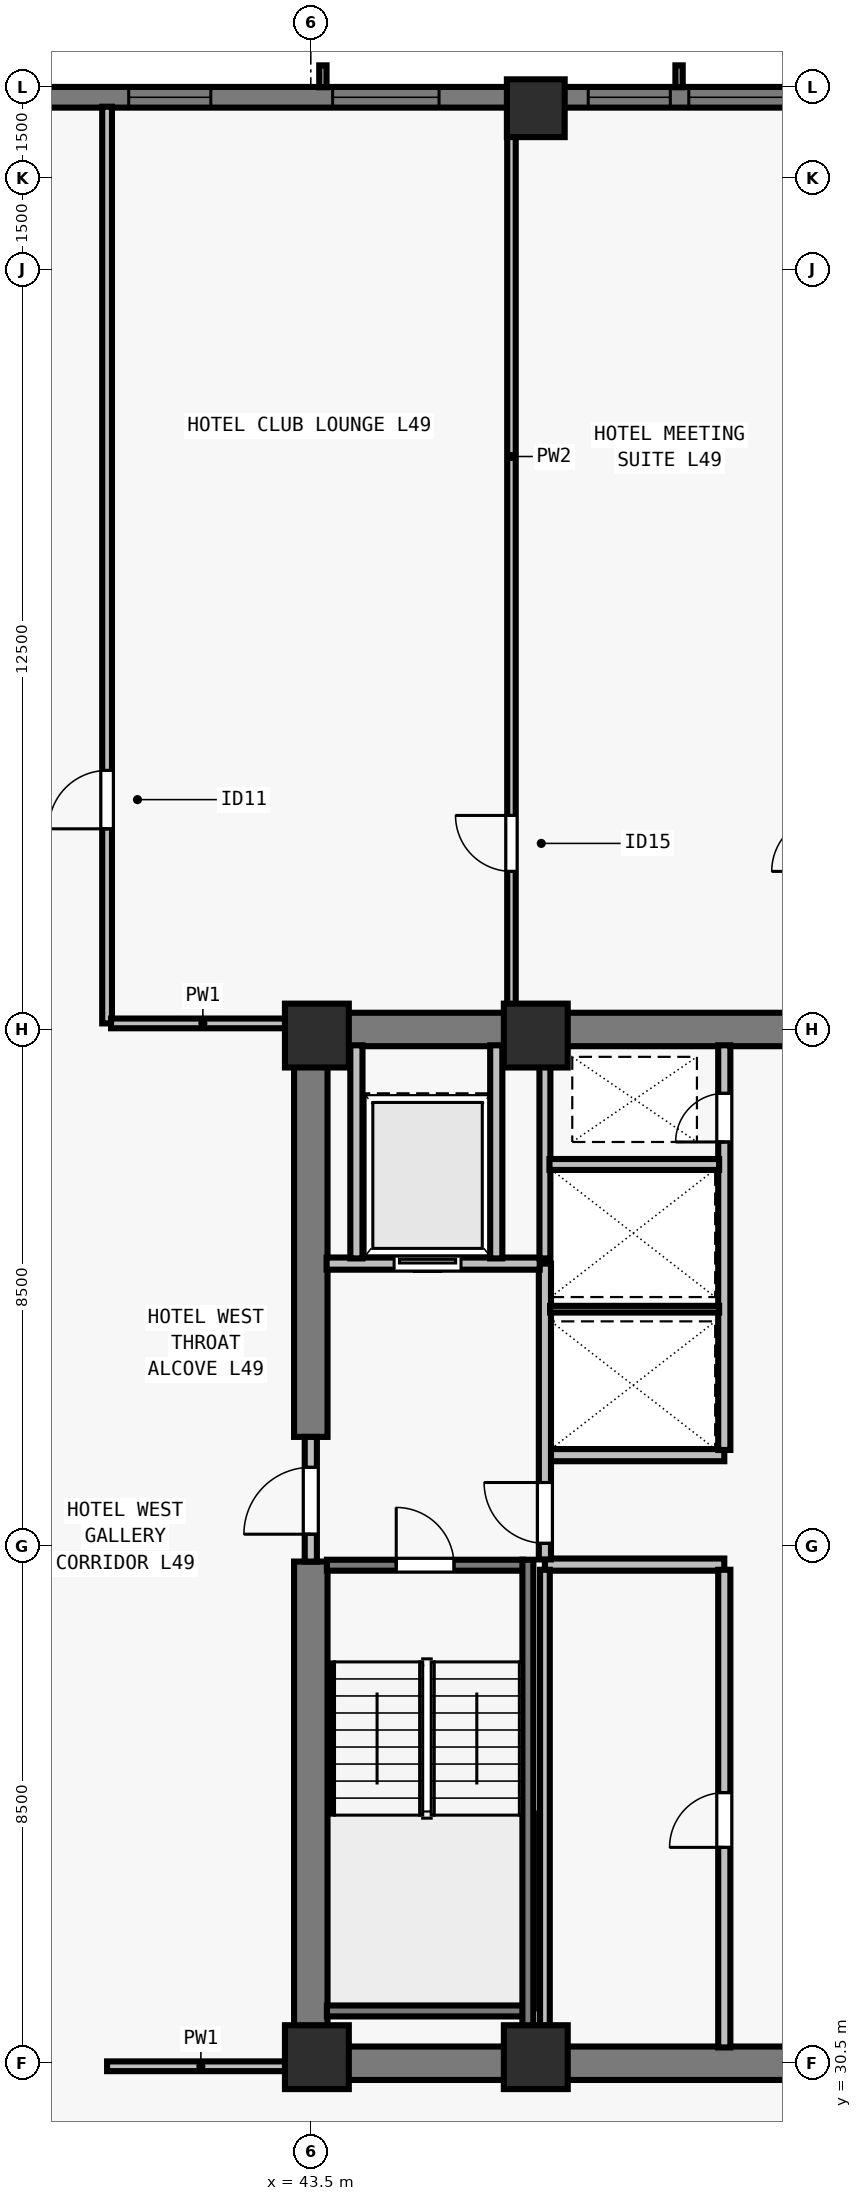
"""IFC4 building model, lengths in metres.
Left out: names, types, materials, properties, quantities, classifications, styles, units other than length and angle.
Written with IfcOpenShell. Run it as: python <this file> out.ifc"""

import sys

from ifc_helpers import new_model, si_unit, direction, frame, frame_2d, origin, origin_2d, place, context, subcontext, project, spatial, rectangle, extrude, element, fill, save


model = new_model("IFC4")
c1 = context("Model", 3, precision=1e-05, world=origin(), true_north=direction((0.0, 1.0)))
c2 = subcontext(c1, "Body", "Model", "MODEL_VIEW")
j1 = project(units=[si_unit("LENGTHUNIT", "METRE"), si_unit("PLANEANGLEUNIT", "RADIAN")], contexts=[c1])
p1 = place(None, origin())
s1 = spatial("IfcSite", under=j1, at=p1, CompositionType="ELEMENT")
p2 = place(p1, origin())
s2 = spatial("IfcBuilding", under=s1, at=p2, CompositionType="ELEMENT")
p3 = place(p2, frame((0.0, 0.0, 179.5)))
s3 = spatial("IfcBuildingStorey", under=s2, at=p3, CompositionType="ELEMENT", Elevation=179.5)
for number, where, z_axis, x_axis in (
    (1, (43.6, 30.6, 0.0), (0.0, 0.0, 1.0), (1.0, 0.0, 0.0)),
    (2, (47.2, 30.6, 0.0), (0.0, 0.0, 1.0), (1.0, 0.0, 0.0)),
    (3, (43.6, 47.4, 0.0), (0.0, 0.0, 1.0), (1.0, 0.0, 0.0)),
    (4, (47.2, 47.4, 0.0), (0.0, 0.0, 1.0), (1.0, 0.0, 0.0)),
):
    element("IfcColumn", number, at=place(p3, frame(where, z_axis=z_axis, x_axis=x_axis)), inside=s3, PredefinedType="COLUMN", context=c2, shape_type="SweptSolid", body=[
        extrude(rectangle(XDim=1.05, YDim=1.05, at=origin_2d()), origin(), (0.0, 0.0, 1.0), 3.5),
    ])
p4 = place(p3, frame((47.2, 62.65, 0.0), z_axis=(0.0, 0.0, 1.0), x_axis=(1.0, 0.0, 0.0)))
e5 = element("IfcColumn", 5, at=p4, inside=s3, PredefinedType="COLUMN", context=c2, shape_type="SweptSolid", body=[
    extrude(rectangle(XDim=0.95, YDim=0.95, at=origin_2d()), origin(), (0.0, 0.0, 1.0), 3.5),
])
p5 = place(p3, frame((32.0, 62.83, 0.0), z_axis=(0.0, 0.0, 1.0), x_axis=(1.0, 0.0, 0.0)))
e6 = element("IfcWall", 6, at=p5, inside=s3, PredefinedType="SOLIDWALL", context=c2, shape_type="SweptSolid", body=[
    extrude(rectangle(XDim=39.682, YDim=0.34, at=frame_2d((19.841, 0.0))), origin(), (0.0, 0.0, 1.0), 3.28),
])
p6 = place(p5, frame((3.902, 0.0, 0.8)))
e7 = element("IfcOpeningElement", 7, at=p6, cuts=e6, PredefinedType="OPENING", context=c2, shape_type="SweptSolid", body=[
    extrude(rectangle(XDim=1.75, YDim=1.66, at=frame_2d((0.875, 0.83))), frame((0.0, 0.18, 0.0), z_axis=(0.0, -1.0, 0.0), x_axis=(1.0, 0.0, 0.0)), (0.0, 0.0, 1.0), 0.36),
])
p7 = place(p5, frame((8.505, 0.0, 0.8)))
e8 = element("IfcOpeningElement", 8, at=p7, cuts=e6, PredefinedType="OPENING", context=c2, shape_type="SweptSolid", body=[
    extrude(rectangle(XDim=1.35, YDim=1.66, at=frame_2d((0.675, 0.83))), frame((0.0, 0.18, 0.0), z_axis=(0.0, -1.0, 0.0), x_axis=(1.0, 0.0, 0.0)), (0.0, 0.0, 1.0), 0.36),
])
p8 = place(p5, frame((11.859, 0.0, 0.8)))
e9 = element("IfcOpeningElement", 9, at=p8, cuts=e6, PredefinedType="OPENING", context=c2, shape_type="SweptSolid", body=[
    extrude(rectangle(XDim=1.75, YDim=1.66, at=frame_2d((0.875, 0.83))), frame((0.0, 0.18, 0.0), z_axis=(0.0, -1.0, 0.0), x_axis=(1.0, 0.0, 0.0)), (0.0, 0.0, 1.0), 0.36),
])
p9 = place(p5, frame((16.062, 0.0, 0.8)))
e10 = element("IfcOpeningElement", 10, at=p9, cuts=e6, PredefinedType="OPENING", context=c2, shape_type="SweptSolid", body=[
    extrude(rectangle(XDim=1.35, YDim=1.66, at=frame_2d((0.675, 0.83))), frame((0.0, 0.18, 0.0), z_axis=(0.0, -1.0, 0.0), x_axis=(1.0, 0.0, 0.0)), (0.0, 0.0, 1.0), 0.36),
])
p10 = place(p5, frame((17.716, 0.0, 0.8)))
e11 = element("IfcOpeningElement", 11, at=p10, cuts=e6, PredefinedType="OPENING", context=c2, shape_type="SweptSolid", body=[
    extrude(rectangle(XDim=1.75, YDim=1.66, at=frame_2d((0.875, 0.83))), frame((0.0, 0.18, 0.0), z_axis=(0.0, -1.0, 0.0), x_axis=(1.0, 0.0, 0.0)), (0.0, 0.0, 1.0), 0.36),
])
p11 = place(p5, frame((22.719, 0.0, 0.8)))
e12 = element("IfcOpeningElement", 12, at=p11, cuts=e6, PredefinedType="OPENING", context=c2, shape_type="SweptSolid", body=[
    extrude(rectangle(XDim=1.35, YDim=1.66, at=frame_2d((0.675, 0.83))), frame((0.0, 0.18, 0.0), z_axis=(0.0, -1.0, 0.0), x_axis=(1.0, 0.0, 0.0)), (0.0, 0.0, 1.0), 0.36),
])
p12 = place(p5, frame((26.073, 0.0, 0.8)))
e13 = element("IfcOpeningElement", 13, at=p12, cuts=e6, PredefinedType="OPENING", context=c2, shape_type="SweptSolid", body=[
    extrude(rectangle(XDim=1.75, YDim=1.66, at=frame_2d((0.875, 0.83))), frame((0.0, 0.18, 0.0), z_axis=(0.0, -1.0, 0.0), x_axis=(1.0, 0.0, 0.0)), (0.0, 0.0, 1.0), 0.36),
])
p13 = place(p5, frame((30.677, 0.0, 0.8)))
e14 = element("IfcOpeningElement", 14, at=p13, cuts=e6, PredefinedType="OPENING", context=c2, shape_type="SweptSolid", body=[
    extrude(rectangle(XDim=1.35, YDim=1.66, at=frame_2d((0.675, 0.83))), frame((0.0, 0.18, 0.0), z_axis=(0.0, -1.0, 0.0), x_axis=(1.0, 0.0, 0.0)), (0.0, 0.0, 1.0), 0.36),
])
p14 = place(p5, frame((33.18, 0.0, 0.8)))
e15 = element("IfcOpeningElement", 15, at=p14, cuts=e6, PredefinedType="OPENING", context=c2, shape_type="SweptSolid", body=[
    extrude(rectangle(XDim=1.75, YDim=1.66, at=frame_2d((0.875, 0.83))), frame((0.0, 0.18, 0.0), z_axis=(0.0, -1.0, 0.0), x_axis=(1.0, 0.0, 0.0)), (0.0, 0.0, 1.0), 0.36),
])
for number, where, z_axis, x_axis in (
    (16, (43.225, 30.5, 0.0), (0.0, 0.0, 1.0), (1.0, 0.0, 0.0)),
    (17, (43.225, 47.5, 0.0), (0.0, 0.0, 1.0), (1.0, 0.0, 0.0)),
):
    element("IfcWall", number, at=place(p3, frame(where, z_axis=z_axis, x_axis=x_axis)), inside=s3, PredefinedType="SHEAR", context=c2, shape_type="SweptSolid", body=[
        extrude(rectangle(XDim=17.55, YDim=0.55, at=frame_2d((8.775, 0.0))), origin(), (0.0, 0.0, 1.0), 3.28),
    ])
p15 = place(p3, frame((43.5, 30.765, 0.0), z_axis=(0.0, 0.0, 1.0), x_axis=(0.0, 1.0, 0.0)))
e18 = element("IfcWall", 18, at=p15, inside=s3, PredefinedType="SHEAR", context=c2, shape_type="SweptSolid", body=[
    extrude(rectangle(XDim=7.985, YDim=0.55, at=frame_2d((3.993, 0.0))), origin(), (0.0, 0.0, 1.0), 3.28),
])
p16 = place(p3, frame((43.5, 40.8, 0.0), z_axis=(0.0, 0.0, 1.0), x_axis=(0.0, 1.0, 0.0)))
e19 = element("IfcWall", 19, at=p16, inside=s3, PredefinedType="SHEAR", context=c2, shape_type="SweptSolid", body=[
    extrude(rectangle(XDim=6.435, YDim=0.55, at=frame_2d((3.218, 0.0))), origin(), (0.0, 0.0, 1.0), 3.28),
])
for number, where, z_axis, x_axis in (
    (20, (47.35, 38.7, 0.0), (0.0, 0.0, 1.0), (1.0, 0.0, 0.0)),
    (21, (47.35, 40.5, 0.0), (0.0, 0.0, 1.0), (1.0, 0.0, 0.0)),
):
    element("IfcWall", number, at=place(p3, frame(where, z_axis=z_axis, x_axis=x_axis)), inside=s3, PredefinedType="SOLIDWALL", context=c2, shape_type="SweptSolid", body=[
        extrude(rectangle(XDim=2.95, YDim=0.2, at=frame_2d((1.475, 0.0))), origin(), (0.0, 0.0, 1.0), 3.28),
    ])
p17 = place(p3, frame((50.3, 30.76, 0.0), z_axis=(0.0, 0.0, 1.0), x_axis=(0.0, 1.0, 0.0)))
e22 = element("IfcWall", 22, at=p17, inside=s3, PredefinedType="SOLIDWALL", context=c2, shape_type="SweptSolid", body=[
    extrude(rectangle(XDim=7.855, YDim=0.2, at=frame_2d((3.927, 0.0))), origin(), (0.0, 0.0, 1.0), 3.28),
])
p18 = place(p17, frame((3.29, 0.0, 0.0)))
e23 = element("IfcOpeningElement", 23, at=p18, cuts=e22, PredefinedType="OPENING", context=c2, shape_type="SweptSolid", body=[
    extrude(rectangle(XDim=0.9, YDim=2.12, at=frame_2d((0.45, 1.06))), frame((0.0, 0.11, 0.0), z_axis=(0.0, -1.0, 0.0), x_axis=(1.0, 0.0, 0.0)), (0.0, 0.0, 1.0), 0.22),
])
p19 = place(p3, frame((50.3, 40.585, 0.0), z_axis=(0.0, 0.0, 1.0), x_axis=(0.0, 1.0, 0.0)))
e24 = element("IfcWall", 24, at=p19, inside=s3, PredefinedType="SOLIDWALL", context=c2, shape_type="SweptSolid", body=[
    extrude(rectangle(XDim=6.655, YDim=0.2, at=frame_2d((3.328, 0.0))), origin(), (0.0, 0.0, 1.0), 3.28),
])
p20 = place(p19, frame((5.065, 0.0, 0.0)))
e25 = element("IfcOpeningElement", 25, at=p20, cuts=e24, PredefinedType="OPENING", context=c2, shape_type="SweptSolid", body=[
    extrude(rectangle(XDim=0.8, YDim=2.08, at=frame_2d((0.4, 1.04))), frame((0.0, 0.11, 0.0), z_axis=(0.0, -1.0, 0.0), x_axis=(1.0, 0.0, 0.0)), (0.0, 0.0, 1.0), 0.22),
])
p21 = place(p3, frame((43.5, 38.75, 0.0), z_axis=(0.0, 0.0, 1.0), x_axis=(0.0, 1.0, 0.0)))
e26 = element("IfcWall", 26, at=p21, inside=s3, PredefinedType="SOLIDWALL", context=c2, shape_type="SweptSolid", body=[
    extrude(rectangle(XDim=2.05, YDim=0.2, at=frame_2d((1.025, 0.0))), origin(), (0.0, 0.0, 1.0), 3.28),
])
p22 = place(p21, frame((0.45, 0.0, 0.0)))
e27 = element("IfcOpeningElement", 27, at=p22, cuts=e26, PredefinedType="OPENING", context=c2, shape_type="SweptSolid", body=[
    extrude(rectangle(XDim=1.1, YDim=2.15, at=frame_2d((0.55, 1.075))), frame((0.0, 0.11, 0.0), z_axis=(0.0, -1.0, 0.0), x_axis=(1.0, 0.0, 0.0)), (0.0, 0.0, 1.0), 0.22),
])
p23 = place(p3, frame((47.35, 38.785, 0.0), z_axis=(0.0, 0.0, 1.0), x_axis=(0.0, 1.0, 0.0)))
e28 = element("IfcWall", 28, at=p23, inside=s3, PredefinedType="SOLIDWALL", context=c2, shape_type="SweptSolid", body=[
    extrude(rectangle(XDim=4.865, YDim=0.2, at=frame_2d((2.433, 0.0))), origin(), (0.0, 0.0, 1.0), 3.28),
])
p24 = place(p23, frame((0.265, 0.0, 0.0)))
e29 = element("IfcOpeningElement", 29, at=p24, cuts=e28, PredefinedType="OPENING", context=c2, shape_type="SweptSolid", body=[
    extrude(rectangle(XDim=1.0, YDim=2.15, at=frame_2d((0.5, 1.075))), frame((0.0, 0.11, 0.0), z_axis=(0.0, -1.0, 0.0), x_axis=(1.0, 0.0, 0.0)), (0.0, 0.0, 1.0), 0.22),
])
p25 = place(p3, frame((43.76, 43.65, 0.0), z_axis=(0.0, 0.0, 1.0), x_axis=(1.0, 0.0, 0.0)))
e30 = element("IfcWall", 30, at=p25, inside=s3, PredefinedType="SOLIDWALL", context=c2, shape_type="SweptSolid", body=[
    extrude(rectangle(XDim=3.505, YDim=0.2, at=frame_2d((1.752, 0.0))), origin(), (0.0, 0.0, 1.0), 3.28),
])
p26 = place(p25, frame((1.11, 0.0, 0.0)))
e31 = element("IfcOpeningElement", 31, at=p26, cuts=e30, PredefinedType="OPENING", context=c2, shape_type="SweptSolid", body=[
    extrude(rectangle(XDim=1.1, YDim=2.2, at=frame_2d((0.55, 1.1))), frame((0.0, 0.11, 0.0), z_axis=(0.0, -1.0, 0.0), x_axis=(1.0, 0.0, 0.0)), (0.0, 0.0, 1.0), 0.22),
])
for number, where, z_axis, x_axis in (
    (32, (46.55, 43.735, 0.0), (0.0, 0.0, 1.0), (0.0, 1.0, 0.0)),
    (33, (44.25, 43.735, 0.0), (0.0, 0.0, 1.0), (0.0, 1.0, 0.0)),
):
    element("IfcWall", number, at=place(p3, frame(where, z_axis=z_axis, x_axis=x_axis)), inside=s3, PredefinedType="SOLIDWALL", context=c2, shape_type="SweptSolid", body=[
        extrude(rectangle(XDim=3.505, YDim=0.2, at=frame_2d((1.752, 0.0))), origin(), (0.0, 0.0, 1.0), 3.28),
    ])
p27 = place(p3, frame((47.35, 30.76, 0.0), z_axis=(0.0, 0.0, 1.0), x_axis=(0.0, 1.0, 0.0)))
e34 = element("IfcWall", 34, at=p27, inside=s3, PredefinedType="PARTITIONING", context=c2, shape_type="SweptSolid", body=[
    extrude(rectangle(XDim=7.855, YDim=0.16, at=frame_2d((3.927, 0.0))), origin(), (0.0, 0.0, 1.0), 3.28),
])
p28 = place(p3, frame((47.35, 43.735, 0.0), z_axis=(0.0, 0.0, 1.0), x_axis=(0.0, 1.0, 0.0)))
e35 = element("IfcWall", 35, at=p28, inside=s3, PredefinedType="SOLIDWALL", context=c2, shape_type="SweptSolid", body=[
    extrude(rectangle(XDim=3.505, YDim=0.18, at=frame_2d((1.752, 0.0))), origin(), (0.0, 0.0, 1.0), 3.28),
])
p29 = place(p3, frame((47.435, 42.9, 0.0), z_axis=(0.0, 0.0, 1.0), x_axis=(1.0, 0.0, 0.0)))
e36 = element("IfcWall", 36, at=p29, inside=s3, PredefinedType="PARTITIONING", context=c2, shape_type="SweptSolid", body=[
    extrude(rectangle(XDim=2.78, YDim=0.11, at=frame_2d((1.39, 0.0))), origin(), (0.0, 0.0, 1.0), 3.28),
])
p30 = place(p3, frame((47.425, 45.28, 0.0), z_axis=(0.0, 0.0, 1.0), x_axis=(1.0, 0.0, 0.0)))
e37 = element("IfcWall", 37, at=p30, inside=s3, PredefinedType="SOLIDWALL", context=c2, shape_type="SweptSolid", body=[
    extrude(rectangle(XDim=2.79, YDim=0.18, at=frame_2d((1.395, 0.0))), origin(), (0.0, 0.0, 1.0), 3.28),
])
p31 = place(p3, frame((40.15, 47.6, 0.0), z_axis=(0.0, 0.0, 1.0), x_axis=(0.0, 1.0, 0.0)))
e38 = element("IfcWall", 38, at=p31, inside=s3, PredefinedType="PARTITIONING", context=c2, shape_type="SweptSolid", body=[
    extrude(rectangle(XDim=15.075, YDim=0.16, at=frame_2d((7.538, 0.0))), origin(), (0.0, 0.0, 1.0), 2.555),
])
p32 = place(p31, frame((3.2, 0.0, 0.0)))
e39 = element("IfcOpeningElement", 39, at=p32, cuts=e38, PredefinedType="OPENING", context=c2, shape_type="SweptSolid", body=[
    extrude(rectangle(XDim=0.96, YDim=2.12, at=frame_2d((0.48, 1.06))), frame((0.0, 0.09, 0.0), z_axis=(0.0, -1.0, 0.0), x_axis=(1.0, 0.0, 0.0)), (0.0, 0.0, 1.0), 0.18),
])
p33 = place(p3, frame((40.15, 30.45, 0.0), z_axis=(0.0, 0.0, 1.0), x_axis=(1.0, 0.0, 0.0)))
e40 = element("IfcWall", 40, at=p33, inside=s3, PredefinedType="PARTITIONING", context=c2, shape_type="SweptSolid", body=[
    extrude(rectangle(XDim=3.085, YDim=0.16, at=frame_2d((1.542, 0.0))), origin(), (0.0, 0.0, 1.0), 3.28),
])
p34 = place(p3, frame((40.215, 47.6, 0.0), z_axis=(0.0, 0.0, 1.0), x_axis=(1.0, 0.0, 0.0)))
e41 = element("IfcWall", 41, at=p34, inside=s3, PredefinedType="PARTITIONING", context=c2, shape_type="SweptSolid", body=[
    extrude(rectangle(XDim=3.02, YDim=0.16, at=frame_2d((1.51, 0.0))), origin(), (0.0, 0.0, 1.0), 3.28),
])
p35 = place(p3, frame((46.8, 47.76, 0.0), z_axis=(0.0, 0.0, 1.0), x_axis=(0.0, 1.0, 0.0)))
e42 = element("IfcWall", 42, at=p35, inside=s3, PredefinedType="PARTITIONING", context=c2, shape_type="SweptSolid", body=[
    extrude(rectangle(XDim=14.915, YDim=0.14, at=frame_2d((7.458, 0.0))), origin(), (0.0, 0.0, 1.0), 3.28),
])
p36 = place(p35, frame((2.34, 0.0, 0.0)))
e43 = element("IfcOpeningElement", 43, at=p36, cuts=e42, PredefinedType="OPENING", context=c2, shape_type="SweptSolid", body=[
    extrude(rectangle(XDim=0.92, YDim=2.12, at=frame_2d((0.46, 1.06))), frame((0.0, 0.08, 0.0), z_axis=(0.0, -1.0, 0.0), x_axis=(1.0, 0.0, 0.0)), (0.0, 0.0, 1.0), 0.16),
])
p37 = place(p3, frame((43.765, 38.69, 0.0), z_axis=(0.0, 0.0, 1.0), x_axis=(1.0, 0.0, 0.0)))
e44 = element("IfcWall", 44, at=p37, inside=s3, PredefinedType="SOLIDWALL", context=c2, shape_type="SweptSolid", body=[
    extrude(rectangle(XDim=3.23, YDim=0.18, at=frame_2d((1.615, 0.0))), origin(), (0.0, 0.0, 1.0), 3.28),
])
p38 = place(p37, frame((1.14, 0.0, 0.0)))
e45 = element("IfcOpeningElement", 45, at=p38, cuts=e44, PredefinedType="OPENING", context=c2, shape_type="SweptSolid", body=[
    extrude(rectangle(XDim=0.95, YDim=2.15, at=frame_2d((0.475, 1.075))), frame((0.0, 0.1, 0.0), z_axis=(0.0, -1.0, 0.0), x_axis=(1.0, 0.0, 0.0)), (0.0, 0.0, 1.0), 0.2),
])
p39 = place(p3, frame((43.765, 31.36, 0.0), z_axis=(0.0, 0.0, 1.0), x_axis=(1.0, 0.0, 0.0)))
e46 = element("IfcWall", 46, at=p39, inside=s3, PredefinedType="SOLIDWALL", context=c2, shape_type="SweptSolid", body=[
    extrude(rectangle(XDim=3.23, YDim=0.18, at=frame_2d((1.615, 0.0))), origin(), (0.0, 0.0, 1.0), 3.28),
])
p40 = place(p3, frame((47.07, 38.78, 0.0), z_axis=(0.0, 0.0, 1.0), x_axis=(0.0, -1.0, 0.0)))
e47 = element("IfcWall", 47, at=p40, inside=s3, PredefinedType="SOLIDWALL", context=c2, shape_type="SweptSolid", body=[
    extrude(rectangle(XDim=8.017, YDim=0.18, at=frame_2d((4.009, 0.0))), origin(), (0.0, 0.0, 1.0), 3.28),
])
p41 = place(p7, origin())
e48 = element("IfcWindow", 48, at=p41, inside=s3, PartitioningType="SINGLE_PANEL", PredefinedType="WINDOW", context=c2, shape_type="SweptSolid", body=[
    extrude(rectangle(XDim=1.35, YDim=1.66, at=frame_2d((0.675, 0.83))), frame((0.0, -0.05, 0.0), z_axis=(0.0, -1.0, 0.0), x_axis=(1.0, 0.0, 0.0)), (0.0, 0.0, 1.0), 0.06),
])
fill(e8, e48)
p42 = place(p8, origin())
e49 = element("IfcWindow", 49, at=p42, inside=s3, PartitioningType="SINGLE_PANEL", PredefinedType="WINDOW", context=c2, shape_type="SweptSolid", body=[
    extrude(rectangle(XDim=1.75, YDim=1.66, at=frame_2d((0.875, 0.83))), frame((0.0, -0.05, 0.0), z_axis=(0.0, -1.0, 0.0), x_axis=(1.0, 0.0, 0.0)), (0.0, 0.0, 1.0), 0.06),
])
fill(e9, e49)
p43 = place(p9, origin())
e50 = element("IfcWindow", 50, at=p43, inside=s3, PartitioningType="SINGLE_PANEL", PredefinedType="WINDOW", context=c2, shape_type="SweptSolid", body=[
    extrude(rectangle(XDim=1.35, YDim=1.66, at=frame_2d((0.675, 0.83))), frame((0.0, -0.05, 0.0), z_axis=(0.0, -1.0, 0.0), x_axis=(1.0, 0.0, 0.0)), (0.0, 0.0, 1.0), 0.06),
])
fill(e10, e50)
p44 = place(p10, origin())
e51 = element("IfcWindow", 51, at=p44, inside=s3, PartitioningType="SINGLE_PANEL", PredefinedType="WINDOW", context=c2, shape_type="SweptSolid", body=[
    extrude(rectangle(XDim=1.75, YDim=1.66, at=frame_2d((0.875, 0.83))), frame((0.0, -0.05, 0.0), z_axis=(0.0, -1.0, 0.0), x_axis=(1.0, 0.0, 0.0)), (0.0, 0.0, 1.0), 0.06),
])
fill(e11, e51)
p45 = place(p22, origin())
e52 = element("IfcDoor", 52, at=p45, inside=s3, OperationType="SINGLE_SWING_LEFT", PredefinedType="DOOR", context=c2, shape_type="SweptSolid", body=[
    extrude(rectangle(XDim=1.1, YDim=2.15, at=frame_2d((0.55, 1.075))), frame((0.0, 0.025, 0.0), z_axis=(0.0, -1.0, 0.0), x_axis=(1.0, 0.0, 0.0)), (0.0, 0.0, 1.0), 0.05),
])
fill(e27, e52)
p46 = place(p24, origin())
e53 = element("IfcDoor", 53, at=p46, inside=s3, OperationType="SINGLE_SWING_RIGHT", PredefinedType="DOOR", context=c2, shape_type="SweptSolid", body=[
    extrude(rectangle(XDim=1.0, YDim=2.15, at=frame_2d((0.5, 1.075))), frame((0.0, 0.025, 0.0), z_axis=(0.0, -1.0, 0.0), x_axis=(1.0, 0.0, 0.0)), (0.0, 0.0, 1.0), 0.05),
])
fill(e29, e53)
p47 = place(p26, origin())
e54 = element("IfcDoor", 54, at=p47, inside=s3, OperationType="SLIDING_TO_LEFT", PredefinedType="DOOR", context=c2, shape_type="SweptSolid", body=[
    extrude(rectangle(XDim=1.1, YDim=2.2, at=frame_2d((0.55, 1.1))), frame((0.0, 0.025, 0.0), z_axis=(0.0, -1.0, 0.0), x_axis=(1.0, 0.0, 0.0)), (0.0, 0.0, 1.0), 0.05),
])
fill(e31, e54)
p48 = place(p18, origin())
e55 = element("IfcDoor", 55, at=p48, inside=s3, OperationType="SINGLE_SWING_LEFT", PredefinedType="DOOR", context=c2, shape_type="SweptSolid", body=[
    extrude(rectangle(XDim=0.9, YDim=2.12, at=frame_2d((0.45, 1.06))), frame((0.0, 0.025, 0.0), z_axis=(0.0, -1.0, 0.0), x_axis=(1.0, 0.0, 0.0)), (0.0, 0.0, 1.0), 0.05),
])
fill(e23, e55)
p49 = place(p20, origin())
e56 = element("IfcDoor", 56, at=p49, inside=s3, OperationType="SINGLE_SWING_LEFT", PredefinedType="DOOR", context=c2, shape_type="SweptSolid", body=[
    extrude(rectangle(XDim=0.8, YDim=2.08, at=frame_2d((0.4, 1.04))), frame((0.0, 0.025, 0.0), z_axis=(0.0, -1.0, 0.0), x_axis=(1.0, 0.0, 0.0)), (0.0, 0.0, 1.0), 0.05),
])
fill(e25, e56)
p50 = place(p32, origin())
e57 = element("IfcDoor", 57, at=p50, inside=s3, OperationType="SINGLE_SWING_LEFT", PredefinedType="DOOR", context=c2, shape_type="SweptSolid", body=[
    extrude(rectangle(XDim=0.96, YDim=2.12, at=frame_2d((0.48, 1.06))), frame((0.0, 0.025, 0.0), z_axis=(0.0, -1.0, 0.0), x_axis=(1.0, 0.0, 0.0)), (0.0, 0.0, 1.0), 0.05),
])
fill(e39, e57)
p51 = place(p36, origin())
e58 = element("IfcDoor", 58, at=p51, inside=s3, OperationType="SINGLE_SWING_RIGHT", PredefinedType="DOOR", context=c2, shape_type="SweptSolid", body=[
    extrude(rectangle(XDim=0.92, YDim=2.12, at=frame_2d((0.46, 1.06))), frame((0.0, 0.025, 0.0), z_axis=(0.0, -1.0, 0.0), x_axis=(1.0, 0.0, 0.0)), (0.0, 0.0, 1.0), 0.05),
])
fill(e43, e58)
p52 = place(p38, origin())
e59 = element("IfcDoor", 59, at=p52, inside=s3, OperationType="SINGLE_SWING_LEFT", PredefinedType="DOOR", context=c2, shape_type="SweptSolid", body=[
    extrude(rectangle(XDim=0.95, YDim=2.15, at=frame_2d((0.475, 1.075))), frame((0.0, 0.025, 0.0), z_axis=(0.0, -1.0, 0.0), x_axis=(1.0, 0.0, 0.0)), (0.0, 0.0, 1.0), 0.05),
])
fill(e45, e59)
save(model, sys.argv[1])
